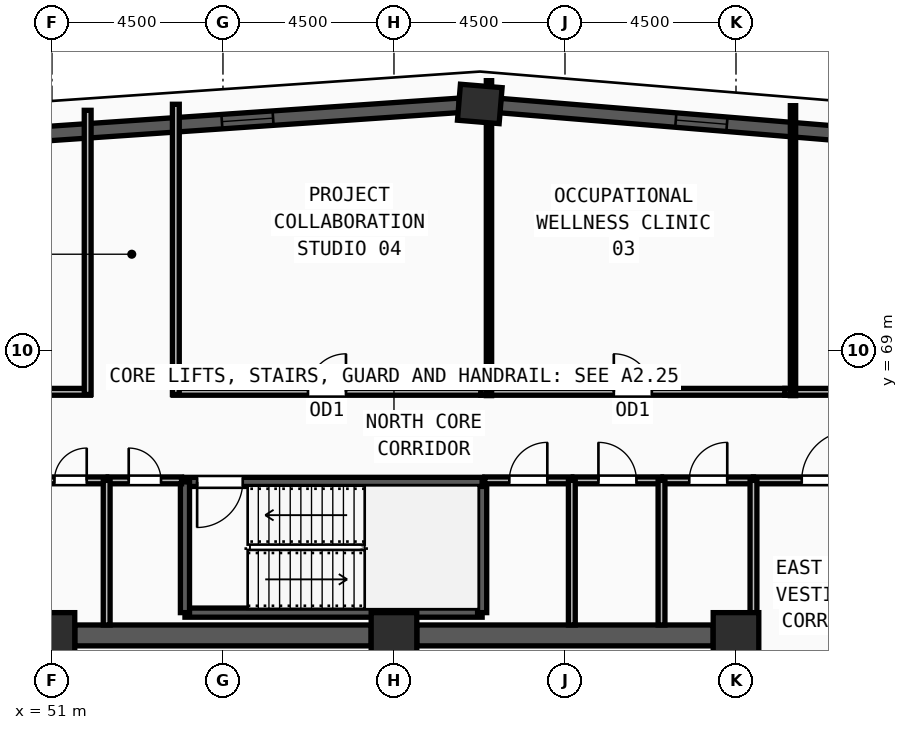
"""IFC4 building model, lengths in metres.
Left out: names, types, materials, properties, quantities, classifications, styles, units other than length and angle.
Written with IfcOpenShell. Run it as: python <this file> out.ifc"""

import sys

from ifc_helpers import new_model, si_unit, direction, frame, frame_2d, origin, origin_2d, place, context, subcontext, project, spatial, rectangle, extrude, source, transform, mapped, element, fill, save


model = new_model("IFC4")
c1 = context("Model", 3, precision=1e-05, world=origin(), true_north=direction((0.0, 1.0)))
c2 = subcontext(c1, "Body", "Model", "MODEL_VIEW")
j1 = project(units=[si_unit("LENGTHUNIT", "METRE"), si_unit("PLANEANGLEUNIT", "RADIAN")], contexts=[c1])
p1 = place(None, origin())
s1 = spatial("IfcSite", under=j1, at=p1, CompositionType="ELEMENT")
p2 = place(p1, origin())
s2 = spatial("IfcBuilding", under=s1, at=p2, CompositionType="ELEMENT")
p3 = place(p2, frame((0.0, 0.0, 328.5)))
s3 = spatial("IfcBuildingStorey", under=s2, at=p3, CompositionType="ELEMENT", Elevation=328.5)
m1 = source(origin(), c2, "Body", "SweptSolid", [
    extrude(rectangle(XDim=1.2, YDim=1.2, at=origin_2d()), origin(), (0.0, 0.0, 1.0), 3.75),
])
for number, where, z_axis, x_axis in (
    (1, (69.0, 61.5, 0.0), (0.0, 0.0, 1.0), (1.0, 0.0, 0.0)),
    (2, (60.0, 61.5, 0.0), (0.0, 0.0, 1.0), (1.0, 0.0, 0.0)),
    (3, (51.0, 61.5, 0.0), (0.0, 0.0, 1.0), (1.0, 0.0, 0.0)),
):
    element("IfcColumn", number, at=place(p3, frame(where, z_axis=z_axis, x_axis=x_axis)), inside=s3, PredefinedType="COLUMN", context=c2, shape_type="MappedRepresentation", body=[
        mapped(m1, transform((0.0, 0.0, 0.0), x_axis=(1.0, 0.0, 0.0), y_axis=(0.0, 1.0, 0.0), z_axis=(0.0, 0.0, 1.0), scale=1.0)),
    ])
m2 = source(origin(), c2, "Body", "SweptSolid", [
    extrude(rectangle(XDim=1.1, YDim=0.95, at=origin_2d()), origin(), (0.0, 0.0, 1.0), 3.75),
])
p4 = place(p3, frame((62.258, 75.485, 0.0), z_axis=(0.0, 0.0, 1.0), x_axis=(-0.996637386818, 0.08193850863, 0.0)))
e4 = element("IfcColumn", 4, at=p4, inside=s3, PredefinedType="COLUMN", context=c2, shape_type="MappedRepresentation", body=[
    mapped(m2, transform((0.0, 0.0, 0.0), x_axis=(1.0, 0.0, 0.0), y_axis=(0.0, 1.0, 0.0), z_axis=(0.0, 0.0, 1.0), scale=1.0)),
])
p5 = place(p3, frame((83.965, 73.699, 0.0), z_axis=(0.0, 0.0, 1.0), x_axis=(-0.996631543612, 0.082009549916, 0.0)))
e5 = element("IfcWall", 5, at=p5, inside=s3, PredefinedType="SOLIDWALL", context=c2, shape_type="SweptSolid", body=[
    extrude(rectangle(XDim=21.241, YDim=0.38, at=frame_2d((10.62, 0.0))), origin(), (0.0, 0.0, 1.0), 3.57),
])
m3 = source(origin(), c2, "Body", "SweptSolid", [
    extrude(rectangle(XDim=1.35, YDim=1.85, at=frame_2d((0.675, 0.925))), frame((0.0, 0.2, 0.0), z_axis=(0.0, -1.0, 0.0), x_axis=(1.0, 0.0, 0.0)), (0.0, 0.0, 1.0), 0.4),
])
p6 = place(p5, frame((4.635, 0.0, 0.55)))
e6 = element("IfcOpeningElement", 6, at=p6, cuts=e5, PredefinedType="OPENING", context=c2, shape_type="MappedRepresentation", body=[
    mapped(m3, transform((0.0, 0.0, 0.0), x_axis=(1.0, 0.0, 0.0), y_axis=(0.0, 1.0, 0.0), z_axis=(0.0, 0.0, 1.0), scale=1.0)),
])
p7 = place(p5, frame((9.945, 0.0, 0.55)))
e7 = element("IfcOpeningElement", 7, at=p7, cuts=e5, PredefinedType="OPENING", context=c2, shape_type="MappedRepresentation", body=[
    mapped(m3, transform((0.0, 0.0, 0.0), x_axis=(1.0, 0.0, 0.0), y_axis=(0.0, 1.0, 0.0), z_axis=(0.0, 0.0, 1.0), scale=1.0)),
])
p8 = place(p5, frame((15.255, 0.0, 0.55)))
e8 = element("IfcOpeningElement", 8, at=p8, cuts=e5, PredefinedType="OPENING", context=c2, shape_type="MappedRepresentation", body=[
    mapped(m3, transform((0.0, 0.0, 0.0), x_axis=(1.0, 0.0, 0.0), y_axis=(0.0, 1.0, 0.0), z_axis=(0.0, 0.0, 1.0), scale=1.0)),
])
p9 = place(p3, frame((61.719, 75.448, 0.0), z_axis=(0.0, 0.0, 1.0), x_axis=(-0.997650373025, -0.068510825445, 0.0)))
e9 = element("IfcWall", 9, at=p9, inside=s3, PredefinedType="SOLIDWALL", context=c2, shape_type="SweptSolid", body=[
    extrude(rectangle(XDim=25.747, YDim=0.38, at=frame_2d((12.873, 0.0))), origin(), (0.0, 0.0, 1.0), 3.57),
])
p10 = place(p9, frame((4.912, 0.0, 0.55)))
e10 = element("IfcOpeningElement", 10, at=p10, cuts=e9, PredefinedType="OPENING", context=c2, shape_type="MappedRepresentation", body=[
    mapped(m3, transform((0.0, 0.0, 0.0), x_axis=(1.0, 0.0, 0.0), y_axis=(0.0, 1.0, 0.0), z_axis=(0.0, 0.0, 1.0), scale=1.0)),
])
p11 = place(p9, frame((12.198, 0.0, 0.55)))
e11 = element("IfcOpeningElement", 11, at=p11, cuts=e9, PredefinedType="OPENING", context=c2, shape_type="MappedRepresentation", body=[
    mapped(m3, transform((0.0, 0.0, 0.0), x_axis=(1.0, 0.0, 0.0), y_axis=(0.0, 1.0, 0.0), z_axis=(0.0, 0.0, 1.0), scale=1.0)),
])
p12 = place(p9, frame((18.635, 0.0, 0.55)))
e12 = element("IfcOpeningElement", 12, at=p12, cuts=e9, PredefinedType="OPENING", context=c2, shape_type="MappedRepresentation", body=[
    mapped(m3, transform((0.0, 0.0, 0.0), x_axis=(1.0, 0.0, 0.0), y_axis=(0.0, 1.0, 0.0), z_axis=(0.0, 0.0, 1.0), scale=1.0)),
])
for number, where, z_axis, x_axis in (
    (13, (51.6, 61.5, 0.0), (0.0, 0.0, 1.0), (1.0, 0.0, 0.0)),
    (14, (60.6, 61.5, 0.0), (0.0, 0.0, 1.0), (1.0, 0.0, 0.0)),
):
    element("IfcWall", number, at=place(p3, frame(where, z_axis=z_axis, x_axis=x_axis)), inside=s3, PredefinedType="SHEAR", context=c2, shape_type="SweptSolid", body=[
        extrude(rectangle(XDim=7.8, YDim=0.55, at=frame_2d((3.9, 0.0))), origin(), (0.0, 0.0, 1.0), 3.57),
    ])
p13 = place(p3, frame((54.5, 62.1, 0.0), z_axis=(0.0, 0.0, 1.0), x_axis=(1.0, 0.0, 0.0)))
e15 = element("IfcWall", 15, at=p13, inside=s3, PredefinedType="SOLIDWALL", context=c2, shape_type="SweptSolid", body=[
    extrude(rectangle(XDim=7.82, YDim=0.24, at=frame_2d((3.91, 0.0))), origin(), (0.0, 0.0, 1.0), 3.57),
])
p14 = place(p3, frame((62.32, 62.1, 0.0), z_axis=(0.0, 0.0, 1.0), x_axis=(0.0, 1.0, 0.0)))
e16 = element("IfcWall", 16, at=p14, inside=s3, PredefinedType="SOLIDWALL", context=c2, shape_type="SweptSolid", body=[
    extrude(rectangle(XDim=3.44, YDim=0.24, at=frame_2d((1.72, 0.0))), origin(), (0.0, 0.0, 1.0), 3.57),
])
p15 = place(p3, frame((62.32, 65.54, 0.0), z_axis=(0.0, 0.0, 1.0), x_axis=(-1.0, 0.0, 0.0)))
e17 = element("IfcWall", 17, at=p15, inside=s3, PredefinedType="SOLIDWALL", context=c2, shape_type="SweptSolid", body=[
    extrude(rectangle(XDim=7.82, YDim=0.24, at=frame_2d((3.91, 0.0))), origin(), (0.0, 0.0, 1.0), 3.57),
])
m4 = source(origin(), c2, "Body", "SweptSolid", [
    extrude(rectangle(XDim=1.2, YDim=2.2, at=frame_2d((0.6, 1.1))), frame((0.0, 0.13, 0.0), z_axis=(0.0, -1.0, 0.0), x_axis=(1.0, 0.0, 0.0)), (0.0, 0.0, 1.0), 0.26),
])
p16 = place(p15, frame((6.3, 0.0, 0.0)))
e18 = element("IfcOpeningElement", 18, at=p16, cuts=e17, PredefinedType="OPENING", context=c2, shape_type="MappedRepresentation", body=[
    mapped(m4, transform((0.0, 0.0, 0.0), x_axis=(1.0, 0.0, 0.0), y_axis=(0.0, 1.0, 0.0), z_axis=(0.0, 0.0, 1.0), scale=1.0)),
])
p17 = place(p3, frame((54.5, 65.54, 0.0), z_axis=(0.0, 0.0, 1.0), x_axis=(0.0, -1.0, 0.0)))
e19 = element("IfcWall", 19, at=p17, inside=s3, PredefinedType="SOLIDWALL", context=c2, shape_type="SweptSolid", body=[
    extrude(rectangle(XDim=3.44, YDim=0.24, at=frame_2d((1.72, 0.0))), origin(), (0.0, 0.0, 1.0), 3.57),
])
p18 = place(p3, frame((50.54, 65.58, 0.0), z_axis=(0.0, 0.0, 1.0), x_axis=(1.0, 0.0, 0.0)))
e20 = element("IfcWall", 20, at=p18, inside=s3, PredefinedType="PARTITIONING", context=c2, shape_type="SweptSolid", body=[
    extrude(rectangle(XDim=1.9, YDim=0.18, at=frame_2d((0.95, 0.0))), origin(), (0.0, 0.0, 1.0), 3.57),
])
m5 = source(origin(), c2, "Body", "SweptSolid", [
    extrude(rectangle(XDim=0.85, YDim=2.1, at=frame_2d((0.425, 1.05))), frame((0.0, 0.1, 0.0), z_axis=(0.0, -1.0, 0.0), x_axis=(1.0, 0.0, 0.0)), (0.0, 0.0, 1.0), 0.2),
])
p19 = place(p18, frame((0.525, 0.0, 0.0)))
e21 = element("IfcOpeningElement", 21, at=p19, cuts=e20, PredefinedType="OPENING", context=c2, shape_type="MappedRepresentation", body=[
    mapped(m5, transform((0.0, 0.0, 0.0), x_axis=(1.0, 0.0, 0.0), y_axis=(0.0, 1.0, 0.0), z_axis=(0.0, 0.0, 1.0), scale=1.0)),
])
p20 = place(p3, frame((52.48, 65.58, 0.0), z_axis=(0.0, 0.0, 1.0), x_axis=(1.0, 0.0, 0.0)))
e22 = element("IfcWall", 22, at=p20, inside=s3, PredefinedType="PARTITIONING", context=c2, shape_type="SweptSolid", body=[
    extrude(rectangle(XDim=1.93, YDim=0.18, at=frame_2d((0.965, 0.0))), origin(), (0.0, 0.0, 1.0), 3.57),
])
p21 = place(p20, frame((0.54, 0.0, 0.0)))
e23 = element("IfcOpeningElement", 23, at=p21, cuts=e22, PredefinedType="OPENING", context=c2, shape_type="MappedRepresentation", body=[
    mapped(m5, transform((0.0, 0.0, 0.0), x_axis=(1.0, 0.0, 0.0), y_axis=(0.0, 1.0, 0.0), z_axis=(0.0, 0.0, 1.0), scale=1.0)),
])
p22 = place(p3, frame((62.39, 65.58, 0.0), z_axis=(0.0, 0.0, 1.0), x_axis=(1.0, 0.0, 0.0)))
e24 = element("IfcWall", 24, at=p22, inside=s3, PredefinedType="PARTITIONING", context=c2, shape_type="SweptSolid", body=[
    extrude(rectangle(XDim=2.29, YDim=0.18, at=frame_2d((1.145, 0.0))), origin(), (0.0, 0.0, 1.0), 3.57),
])
m6 = source(origin(), c2, "Body", "SweptSolid", [
    extrude(rectangle(XDim=1.0, YDim=2.2, at=frame_2d((0.5, 1.1))), frame((0.0, 0.1, 0.0), z_axis=(0.0, -1.0, 0.0), x_axis=(1.0, 0.0, 0.0)), (0.0, 0.0, 1.0), 0.2),
])
p23 = place(p22, frame((0.645, 0.0, 0.0)))
e25 = element("IfcOpeningElement", 25, at=p23, cuts=e24, PredefinedType="OPENING", context=c2, shape_type="MappedRepresentation", body=[
    mapped(m6, transform((0.0, 0.0, 0.0), x_axis=(1.0, 0.0, 0.0), y_axis=(0.0, 1.0, 0.0), z_axis=(0.0, 0.0, 1.0), scale=1.0)),
])
p24 = place(p3, frame((64.72, 65.58, 0.0), z_axis=(0.0, 0.0, 1.0), x_axis=(1.0, 0.0, 0.0)))
e26 = element("IfcWall", 26, at=p24, inside=s3, PredefinedType="PARTITIONING", context=c2, shape_type="SweptSolid", body=[
    extrude(rectangle(XDim=2.32, YDim=0.18, at=frame_2d((1.16, 0.0))), origin(), (0.0, 0.0, 1.0), 3.57),
])
p25 = place(p24, frame((0.66, 0.0, 0.0)))
e27 = element("IfcOpeningElement", 27, at=p25, cuts=e26, PredefinedType="OPENING", context=c2, shape_type="MappedRepresentation", body=[
    mapped(m6, transform((0.0, 0.0, 0.0), x_axis=(1.0, 0.0, 0.0), y_axis=(0.0, 1.0, 0.0), z_axis=(0.0, 0.0, 1.0), scale=1.0)),
])
p26 = place(p3, frame((67.08, 65.58, 0.0), z_axis=(0.0, 0.0, 1.0), x_axis=(1.0, 0.0, 0.0)))
e28 = element("IfcWall", 28, at=p26, inside=s3, PredefinedType="PARTITIONING", context=c2, shape_type="SweptSolid", body=[
    extrude(rectangle(XDim=2.38, YDim=0.18, at=frame_2d((1.19, 0.0))), origin(), (0.0, 0.0, 1.0), 3.57),
])
p27 = place(p26, frame((0.69, 0.0, 0.0)))
e29 = element("IfcOpeningElement", 29, at=p27, cuts=e28, PredefinedType="OPENING", context=c2, shape_type="MappedRepresentation", body=[
    mapped(m6, transform((0.0, 0.0, 0.0), x_axis=(1.0, 0.0, 0.0), y_axis=(0.0, 1.0, 0.0), z_axis=(0.0, 0.0, 1.0), scale=1.0)),
])
p28 = place(p3, frame((69.46, 65.58, 0.0), z_axis=(0.0, 0.0, 1.0), x_axis=(1.0, 0.0, 0.0)))
e30 = element("IfcWall", 30, at=p28, inside=s3, PredefinedType="PARTITIONING", context=c2, shape_type="SweptSolid", body=[
    extrude(rectangle(XDim=3.84, YDim=0.18, at=frame_2d((1.92, 0.0))), origin(), (0.0, 0.0, 1.0), 3.57),
])
m7 = source(origin(), c2, "Body", "SweptSolid", [
    extrude(rectangle(XDim=1.3, YDim=2.2, at=frame_2d((0.65, 1.1))), frame((0.0, 0.1, 0.0), z_axis=(0.0, -1.0, 0.0), x_axis=(1.0, 0.0, 0.0)), (0.0, 0.0, 1.0), 0.2),
])
p29 = place(p28, frame((1.27, 0.0, 0.0)))
e31 = element("IfcOpeningElement", 31, at=p29, cuts=e30, PredefinedType="OPENING", context=c2, shape_type="MappedRepresentation", body=[
    mapped(m7, transform((0.0, 0.0, 0.0), x_axis=(1.0, 0.0, 0.0), y_axis=(0.0, 1.0, 0.0), z_axis=(0.0, 0.0, 1.0), scale=1.0)),
])
p30 = place(p3, frame((70.285, 67.91, 0.0), z_axis=(0.0, 0.0, 1.0), x_axis=(1.0, 0.0, 0.0)))
e32 = element("IfcWall", 32, at=p30, inside=s3, PredefinedType="PARTITIONING", context=c2, shape_type="SweptSolid", body=[
    extrude(rectangle(XDim=5.345, YDim=0.18, at=frame_2d((2.672, 0.0))), origin(), (0.0, 0.0, 1.0), 3.57),
])
p31 = place(p30, frame((2.172, 0.0, 0.0)))
e33 = element("IfcOpeningElement", 33, at=p31, cuts=e32, PredefinedType="OPENING", context=c2, shape_type="MappedRepresentation", body=[
    mapped(m6, transform((0.0, 0.0, 0.0), x_axis=(1.0, 0.0, 0.0), y_axis=(0.0, 1.0, 0.0), z_axis=(0.0, 0.0, 1.0), scale=1.0)),
])
p32 = place(p3, frame((62.285, 67.91, 0.0), z_axis=(0.0, 0.0, 1.0), x_axis=(1.0, 0.0, 0.0)))
e34 = element("IfcWall", 34, at=p32, inside=s3, PredefinedType="PARTITIONING", context=c2, shape_type="SweptSolid", body=[
    extrude(rectangle(XDim=8.0, YDim=0.18, at=frame_2d((4.0, 0.0))), origin(), (0.0, 0.0, 1.0), 3.57),
])
p33 = place(p32, frame((3.5, 0.0, 0.0)))
e35 = element("IfcOpeningElement", 35, at=p33, cuts=e34, PredefinedType="OPENING", context=c2, shape_type="MappedRepresentation", body=[
    mapped(m6, transform((0.0, 0.0, 0.0), x_axis=(1.0, 0.0, 0.0), y_axis=(0.0, 1.0, 0.0), z_axis=(0.0, 0.0, 1.0), scale=1.0)),
])
p34 = place(p3, frame((54.19, 67.91, 0.0), z_axis=(0.0, 0.0, 1.0), x_axis=(1.0, 0.0, 0.0)))
e36 = element("IfcWall", 36, at=p34, inside=s3, PredefinedType="PARTITIONING", context=c2, shape_type="SweptSolid", body=[
    extrude(rectangle(XDim=8.095, YDim=0.18, at=frame_2d((4.047, 0.0))), origin(), (0.0, 0.0, 1.0), 3.57),
])
p35 = place(p34, frame((3.547, 0.0, 0.0)))
e37 = element("IfcOpeningElement", 37, at=p35, cuts=e36, PredefinedType="OPENING", context=c2, shape_type="MappedRepresentation", body=[
    mapped(m6, transform((0.0, 0.0, 0.0), x_axis=(1.0, 0.0, 0.0), y_axis=(0.0, 1.0, 0.0), z_axis=(0.0, 0.0, 1.0), scale=1.0)),
])
p36 = place(p3, frame((44.37, 67.91, 0.0), z_axis=(0.0, 0.0, 1.0), x_axis=(1.0, 0.0, 0.0)))
e38 = element("IfcWall", 38, at=p36, inside=s3, PredefinedType="PARTITIONING", context=c2, shape_type="SweptSolid", body=[
    extrude(rectangle(XDim=7.64, YDim=0.18, at=frame_2d((3.82, 0.0))), origin(), (0.0, 0.0, 1.0), 3.57),
])
m8 = source(origin(), c2, "Body", "SweptSolid", [
    extrude(rectangle(XDim=1.5, YDim=2.2, at=frame_2d((0.75, 1.1))), frame((0.0, 0.1, 0.0), z_axis=(0.0, -1.0, 0.0), x_axis=(1.0, 0.0, 0.0)), (0.0, 0.0, 1.0), 0.2),
])
p37 = place(p36, frame((3.07, 0.0, 0.0)))
e39 = element("IfcOpeningElement", 39, at=p37, cuts=e38, PredefinedType="OPENING", context=c2, shape_type="MappedRepresentation", body=[
    mapped(m8, transform((0.0, 0.0, 0.0), x_axis=(1.0, 0.0, 0.0), y_axis=(0.0, 1.0, 0.0), z_axis=(0.0, 0.0, 1.0), scale=1.0)),
])
for number, where, z_axis, x_axis in (
    (40, (52.44, 61.775, 0.0), (0.0, 0.0, 1.0), (0.0, 1.0, 0.0)),
    (41, (64.68, 61.775, 0.0), (0.0, 0.0, 1.0), (0.0, 1.0, 0.0)),
    (42, (67.04, 61.775, 0.0), (0.0, 0.0, 1.0), (0.0, 1.0, 0.0)),
):
    element("IfcWall", number, at=place(p3, frame(where, z_axis=z_axis, x_axis=x_axis)), inside=s3, PredefinedType="PARTITIONING", context=c2, shape_type="SweptSolid", body=[
        extrude(rectangle(XDim=3.805, YDim=0.18, at=frame_2d((1.903, 0.0))), origin(), (0.0, 0.0, 1.0), 3.57),
    ])
p38 = place(p3, frame((69.46, 61.95, 0.0), z_axis=(0.0, 0.0, 1.0), x_axis=(0.0, 1.0, 0.0)))
e43 = element("IfcWall", 43, at=p38, inside=s3, PredefinedType="PARTITIONING", context=c2, shape_type="SweptSolid", body=[
    extrude(rectangle(XDim=3.63, YDim=0.18, at=frame_2d((1.815, 0.0))), origin(), (0.0, 0.0, 1.0), 3.57),
])
p39 = place(p3, frame((54.26, 75.476, 0.0), z_axis=(0.0, 0.0, 1.0), x_axis=(0.0, -1.0, 0.0)))
e44 = element("IfcWall", 44, at=p39, inside=s3, PredefinedType="PARTITIONING", context=c2, shape_type="SweptSolid", body=[
    extrude(rectangle(XDim=7.636, YDim=0.18, at=frame_2d((3.818, 0.0))), origin(), (0.0, 0.0, 1.0), 3.57),
])
p40 = place(p3, frame((51.94, 67.84, 0.0), z_axis=(0.0, 0.0, 1.0), x_axis=(0.0, 1.0, 0.0)))
e45 = element("IfcWall", 45, at=p40, inside=s3, PredefinedType="PARTITIONING", context=c2, shape_type="SweptSolid", body=[
    extrude(rectangle(XDim=7.477, YDim=0.18, at=frame_2d((3.738, 0.0))), origin(), (0.0, 0.0, 1.0), 3.57),
])
p41 = place(p3, frame((62.5, 67.81, 0.0), z_axis=(0.0, 0.0, 1.0), x_axis=(0.0, 1.0, 0.0)))
e46 = element("IfcWall", 46, at=p41, inside=s3, PredefinedType="PARTITIONING", context=c2, shape_type="SweptSolid", body=[
    extrude(rectangle(XDim=8.287, YDim=0.14, at=frame_2d((4.144, 0.0))), origin(), (0.0, 0.0, 1.0), 3.57),
])
p42 = place(p3, frame((70.5, 67.81, 0.0), z_axis=(0.0, 0.0, 1.0), x_axis=(0.0, 1.0, 0.0)))
e47 = element("IfcWall", 47, at=p42, inside=s3, PredefinedType="PARTITIONING", context=c2, shape_type="SweptSolid", body=[
    extrude(rectangle(XDim=7.629, YDim=0.14, at=frame_2d((3.814, 0.0))), origin(), (0.0, 0.0, 1.0), 3.57),
])
m9 = source(origin(), c2, "Body", "SweptSolid", [
    extrude(rectangle(XDim=1.35, YDim=1.85, at=frame_2d((0.675, 0.925))), frame((0.0, 0.03, 0.0), z_axis=(0.0, -1.0, 0.0), x_axis=(1.0, 0.0, 0.0)), (0.0, 0.0, 1.0), 0.06),
])
p43 = place(p8, origin())
e48 = element("IfcWindow", 48, at=p43, inside=s3, PartitioningType="SINGLE_PANEL", PredefinedType="WINDOW", context=c2, shape_type="MappedRepresentation", body=[
    mapped(m9, transform((0.0, 0.0, 0.0), x_axis=(1.0, 0.0, 0.0), y_axis=(0.0, 1.0, 0.0), z_axis=(0.0, 0.0, 1.0), scale=1.0)),
])
fill(e8, e48)
p44 = place(p10, origin())
e49 = element("IfcWindow", 49, at=p44, inside=s3, PartitioningType="SINGLE_PANEL", PredefinedType="WINDOW", context=c2, shape_type="MappedRepresentation", body=[
    mapped(m9, transform((0.0, 0.0, 0.0), x_axis=(1.0, 0.0, 0.0), y_axis=(0.0, 1.0, 0.0), z_axis=(0.0, 0.0, 1.0), scale=1.0)),
])
fill(e10, e49)
m10 = source(origin(), c2, "Body", "SweptSolid", [
    extrude(rectangle(XDim=1.2, YDim=2.2, at=frame_2d((0.6, 1.1))), frame((0.0, 0.025, 0.0), z_axis=(0.0, -1.0, 0.0), x_axis=(1.0, 0.0, 0.0)), (0.0, 0.0, 1.0), 0.05),
])
p45 = place(p16, origin())
e50 = element("IfcDoor", 50, at=p45, inside=s3, OperationType="SINGLE_SWING_RIGHT", PredefinedType="DOOR", context=c2, shape_type="MappedRepresentation", body=[
    mapped(m10, transform((0.0, 0.0, 0.0), x_axis=(1.0, 0.0, 0.0), y_axis=(0.0, 1.0, 0.0), z_axis=(0.0, 0.0, 1.0), scale=1.0)),
])
fill(e18, e50)
m11 = source(origin(), c2, "Body", "SweptSolid", [
    extrude(rectangle(XDim=0.85, YDim=2.1, at=frame_2d((0.425, 1.05))), frame((0.0, 0.025, 0.0), z_axis=(0.0, -1.0, 0.0), x_axis=(1.0, 0.0, 0.0)), (0.0, 0.0, 1.0), 0.05),
])
p46 = place(p19, origin())
e51 = element("IfcDoor", 51, at=p46, inside=s3, OperationType="SINGLE_SWING_RIGHT", PredefinedType="DOOR", context=c2, shape_type="MappedRepresentation", body=[
    mapped(m11, transform((0.0, 0.0, 0.0), x_axis=(1.0, 0.0, 0.0), y_axis=(0.0, 1.0, 0.0), z_axis=(0.0, 0.0, 1.0), scale=1.0)),
])
fill(e21, e51)
p47 = place(p21, origin())
e52 = element("IfcDoor", 52, at=p47, inside=s3, OperationType="SINGLE_SWING_LEFT", PredefinedType="DOOR", context=c2, shape_type="MappedRepresentation", body=[
    mapped(m11, transform((0.0, 0.0, 0.0), x_axis=(1.0, 0.0, 0.0), y_axis=(0.0, 1.0, 0.0), z_axis=(0.0, 0.0, 1.0), scale=1.0)),
])
fill(e23, e52)
m12 = source(origin(), c2, "Body", "SweptSolid", [
    extrude(rectangle(XDim=1.0, YDim=2.2, at=frame_2d((0.5, 1.1))), frame((0.0, 0.025, 0.0), z_axis=(0.0, -1.0, 0.0), x_axis=(1.0, 0.0, 0.0)), (0.0, 0.0, 1.0), 0.05),
])
p48 = place(p23, origin())
e53 = element("IfcDoor", 53, at=p48, inside=s3, OperationType="SINGLE_SWING_RIGHT", PredefinedType="DOOR", context=c2, shape_type="MappedRepresentation", body=[
    mapped(m12, transform((0.0, 0.0, 0.0), x_axis=(1.0, 0.0, 0.0), y_axis=(0.0, 1.0, 0.0), z_axis=(0.0, 0.0, 1.0), scale=1.0)),
])
fill(e25, e53)
p49 = place(p25, origin())
e54 = element("IfcDoor", 54, at=p49, inside=s3, OperationType="SINGLE_SWING_LEFT", PredefinedType="DOOR", context=c2, shape_type="MappedRepresentation", body=[
    mapped(m12, transform((0.0, 0.0, 0.0), x_axis=(1.0, 0.0, 0.0), y_axis=(0.0, 1.0, 0.0), z_axis=(0.0, 0.0, 1.0), scale=1.0)),
])
fill(e27, e54)
p50 = place(p27, origin())
e55 = element("IfcDoor", 55, at=p50, inside=s3, OperationType="SINGLE_SWING_RIGHT", PredefinedType="DOOR", context=c2, shape_type="MappedRepresentation", body=[
    mapped(m12, transform((0.0, 0.0, 0.0), x_axis=(1.0, 0.0, 0.0), y_axis=(0.0, 1.0, 0.0), z_axis=(0.0, 0.0, 1.0), scale=1.0)),
])
fill(e29, e55)
m13 = source(origin(), c2, "Body", "SweptSolid", [
    extrude(rectangle(XDim=1.3, YDim=2.2, at=frame_2d((0.65, 1.1))), frame((0.0, 0.025, 0.0), z_axis=(0.0, -1.0, 0.0), x_axis=(1.0, 0.0, 0.0)), (0.0, 0.0, 1.0), 0.05),
])
p51 = place(p29, origin())
e56 = element("IfcDoor", 56, at=p51, inside=s3, OperationType="SINGLE_SWING_RIGHT", PredefinedType="DOOR", context=c2, shape_type="MappedRepresentation", body=[
    mapped(m13, transform((0.0, 0.0, 0.0), x_axis=(1.0, 0.0, 0.0), y_axis=(0.0, 1.0, 0.0), z_axis=(0.0, 0.0, 1.0), scale=1.0)),
])
fill(e31, e56)
p52 = place(p33, origin())
e57 = element("IfcDoor", 57, at=p52, inside=s3, OperationType="SINGLE_SWING_LEFT", PredefinedType="DOOR", context=c2, shape_type="MappedRepresentation", body=[
    mapped(m12, transform((0.0, 0.0, 0.0), x_axis=(1.0, 0.0, 0.0), y_axis=(0.0, 1.0, 0.0), z_axis=(0.0, 0.0, 1.0), scale=1.0)),
])
fill(e35, e57)
p53 = place(p35, origin())
e58 = element("IfcDoor", 58, at=p53, inside=s3, OperationType="SINGLE_SWING_RIGHT", PredefinedType="DOOR", context=c2, shape_type="MappedRepresentation", body=[
    mapped(m12, transform((0.0, 0.0, 0.0), x_axis=(1.0, 0.0, 0.0), y_axis=(0.0, 1.0, 0.0), z_axis=(0.0, 0.0, 1.0), scale=1.0)),
])
fill(e37, e58)
save(model, sys.argv[1])
